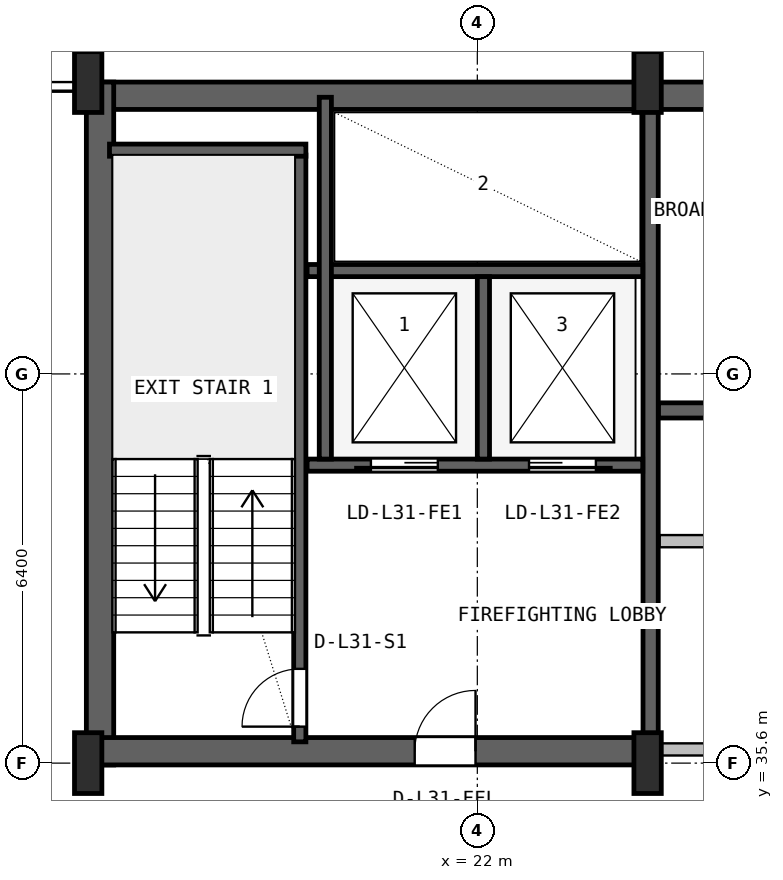
"""IFC4 building model, lengths in metres.
Left out: names, types, materials, properties, quantities, classifications, styles, units other than length and angle.
Written with IfcOpenShell. Run it as: python <this file> out.ifc"""

import sys

from ifc_helpers import new_model, si_unit, direction, frame, frame_2d, origin, origin_2d, place, context, subcontext, project, spatial, rectangle, i_section, extrude, source, transform, mapped, element, fill, save


model = new_model("IFC4")
c1 = context("Model", 3, precision=1e-05, world=origin(), true_north=direction((0.0, 1.0)))
c2 = subcontext(c1, "Body", "Model", "MODEL_VIEW")
j1 = project(units=[si_unit("LENGTHUNIT", "METRE"), si_unit("PLANEANGLEUNIT", "RADIAN")], contexts=[c1])
p1 = place(None, origin())
s1 = spatial("IfcSite", under=j1, at=p1, CompositionType="ELEMENT")
p2 = place(p1, origin())
s2 = spatial("IfcBuilding", under=s1, at=p2, CompositionType="ELEMENT")
p3 = place(p2, frame((0.0, 0.0, 129.6)))
s3 = spatial("IfcBuildingStorey", under=s2, at=p3, CompositionType="ELEMENT", Elevation=129.6)
p4 = place(p3, frame((15.6, 46.575, 0.0), z_axis=(0.0, 0.0, 1.0), x_axis=(1.0, 0.0, 0.0)))
e1 = element("IfcWall", 1, at=p4, inside=s3, PredefinedType="SHEAR", context=c2, shape_type="SweptSolid", body=[
    extrude(rectangle(XDim=36.8, YDim=0.45, at=frame_2d((18.4, 0.0))), origin(), (0.0, 0.0, 1.0), 3.55),
])
p5 = place(p3, frame((15.795, 35.57, 0.0), z_axis=(0.0, 0.0, 1.0), x_axis=(0.0, 1.0, 0.0)))
e2 = element("IfcWall", 2, at=p5, inside=s3, PredefinedType="SHEAR", context=c2, shape_type="SweptSolid", body=[
    extrude(rectangle(XDim=11.23, YDim=0.45, at=frame_2d((5.615, 0.0))), origin(), (0.0, 0.0, 1.0), 3.55),
])
p6 = place(p3, frame((15.57, 35.795, 0.0), z_axis=(0.0, 0.0, 1.0), x_axis=(1.0, 0.0, 0.0)))
e3 = element("IfcWall", 3, at=p6, inside=s3, PredefinedType="SHEAR", context=c2, shape_type="SweptSolid", body=[
    extrude(rectangle(XDim=9.23, YDim=0.45, at=frame_2d((4.615, 0.0))), origin(), (0.0, 0.0, 1.0), 3.55),
])
p7 = place(p6, frame((5.4, 0.0, 0.0)))
e4 = element("IfcOpeningElement", 4, at=p7, cuts=e3, PredefinedType="OPENING", context=c2, shape_type="SweptSolid", body=[
    extrude(rectangle(XDim=1.0, YDim=2.1, at=frame_2d((0.5, 1.05))), frame((0.0, 0.235, 0.0), z_axis=(0.0, -1.0, 0.0), x_axis=(1.0, 0.0, 0.0)), (0.0, 0.0, 1.0), 0.47),
])
m1 = source(origin(), c2, "Body", "SweptSolid", [
    extrude(i_section(OverallWidth=0.45, OverallDepth=1.0, WebThickness=0.016, FlangeThickness=0.03, FilletRadius=0.016, at=origin_2d()), origin(), (0.0, 0.0, 1.0), 3.8),
])
for number, where, z_axis, x_axis in (
    (5, (15.6, 35.6, 0.0), (0.0, 0.0, 1.0), (1.0, 0.0, 0.0)),
    (6, (15.6, 46.8, 0.0), (0.0, 0.0, 1.0), (1.0, 0.0, 0.0)),
    (7, (24.8, 35.6, 0.0), (0.0, 0.0, 1.0), (1.0, 0.0, 0.0)),
    (8, (24.8, 46.8, 0.0), (0.0, 0.0, 1.0), (1.0, 0.0, 0.0)),
):
    element("IfcColumn", number, at=place(p3, frame(where, z_axis=z_axis, x_axis=x_axis)), inside=s3, PredefinedType="COLUMN", context=c2, shape_type="MappedRepresentation", body=[
        mapped(m1, transform((0.0, 0.0, 0.0), x_axis=(1.0, 0.0, 0.0), y_axis=(0.0, 1.0, 0.0), z_axis=(0.0, 0.0, 1.0), scale=1.0)),
    ])
p8 = place(p3, frame((19.08, 35.95, 0.0), z_axis=(0.0, 0.0, 1.0), x_axis=(0.0, 1.0, 0.0)))
e9 = element("IfcWall", 9, at=p8, inside=s3, PredefinedType="SHEAR", context=c2, shape_type="SweptSolid", body=[
    extrude(rectangle(XDim=9.65, YDim=0.2, at=frame_2d((4.825, 0.0))), origin(), (0.0, 0.0, 1.0), 3.55),
])
p9 = place(p8, frame((0.25, 0.0, 0.0)))
e10 = element("IfcOpeningElement", 10, at=p9, cuts=e9, PredefinedType="OPENING", context=c2, shape_type="SweptSolid", body=[
    extrude(rectangle(XDim=0.95, YDim=2.1, at=frame_2d((0.475, 1.05))), frame((0.0, 0.11, 0.0), z_axis=(0.0, -1.0, 0.0), x_axis=(1.0, 0.0, 0.0)), (0.0, 0.0, 1.0), 0.22),
])
p10 = place(p3, frame((15.95, 45.68, 0.0), z_axis=(0.0, 0.0, 1.0), x_axis=(1.0, 0.0, 0.0)))
e11 = element("IfcWall", 11, at=p10, inside=s3, PredefinedType="SHEAR", context=c2, shape_type="SweptSolid", body=[
    extrude(rectangle(XDim=3.23, YDim=0.2, at=frame_2d((1.615, 0.0))), origin(), (0.0, 0.0, 1.0), 3.55),
])
p11 = place(p3, frame((24.85, 36.05, 0.0), z_axis=(0.0, 0.0, 1.0), x_axis=(0.0, 1.0, 0.0)))
e12 = element("IfcWall", 12, at=p11, inside=s3, PredefinedType="SHEAR", context=c2, shape_type="SweptSolid", body=[
    extrude(rectangle(XDim=10.45, YDim=0.25, at=frame_2d((5.225, 0.0))), origin(), (0.0, 0.0, 1.0), 3.55),
])
p12 = place(p3, frame((19.2, 40.5, 0.0), z_axis=(0.0, 0.0, 1.0), x_axis=(1.0, 0.0, 0.0)))
e13 = element("IfcWall", 13, at=p12, inside=s3, PredefinedType="SHEAR", context=c2, shape_type="SweptSolid", body=[
    extrude(rectangle(XDim=5.52, YDim=0.2, at=frame_2d((2.76, 0.0))), origin(), (0.0, 0.0, 1.0), 3.55),
])
p13 = place(p12, frame((1.05, 0.0, 0.0)))
e14 = element("IfcOpeningElement", 14, at=p13, cuts=e13, PredefinedType="OPENING", context=c2, shape_type="SweptSolid", body=[
    extrude(rectangle(XDim=1.1, YDim=2.18, at=frame_2d((0.55, 1.09))), frame((0.0, 0.11, 0.0), z_axis=(0.0, -1.0, 0.0), x_axis=(1.0, 0.0, 0.0)), (0.0, 0.0, 1.0), 0.22),
])
p14 = place(p12, frame((3.65, 0.0, 0.0)))
e15 = element("IfcOpeningElement", 15, at=p14, cuts=e13, PredefinedType="OPENING", context=c2, shape_type="SweptSolid", body=[
    extrude(rectangle(XDim=1.1, YDim=2.18, at=frame_2d((0.55, 1.09))), frame((0.0, 0.11, 0.0), z_axis=(0.0, -1.0, 0.0), x_axis=(1.0, 0.0, 0.0)), (0.0, 0.0, 1.0), 0.22),
])
p15 = place(p3, frame((19.2, 43.7, 0.0), z_axis=(0.0, 0.0, 1.0), x_axis=(1.0, 0.0, 0.0)))
e16 = element("IfcWall", 16, at=p15, inside=s3, PredefinedType="SHEAR", context=c2, shape_type="SweptSolid", body=[
    extrude(rectangle(XDim=5.52, YDim=0.2, at=frame_2d((2.76, 0.0))), origin(), (0.0, 0.0, 1.0), 3.55),
])
p16 = place(p3, frame((22.1, 40.6, 0.0), z_axis=(0.0, 0.0, 1.0), x_axis=(0.0, 1.0, 0.0)))
e17 = element("IfcWall", 17, at=p16, inside=s3, PredefinedType="SHEAR", context=c2, shape_type="SweptSolid", body=[
    extrude(rectangle(XDim=3.0, YDim=0.2, at=frame_2d((1.5, 0.0))), origin(), (0.0, 0.0, 1.0), 3.55),
])
p17 = place(p3, frame((19.5, 40.6, 0.0), z_axis=(0.0, 0.0, 1.0), x_axis=(0.0, 1.0, 0.0)))
e18 = element("IfcWall", 18, at=p17, inside=s3, PredefinedType="SHEAR", context=c2, shape_type="SweptSolid", body=[
    extrude(rectangle(XDim=5.95, YDim=0.2, at=frame_2d((2.975, 0.0))), origin(), (0.0, 0.0, 1.0), 3.55),
])
p18 = place(p3, frame((24.98, 41.4, 0.0), z_axis=(0.0, 0.0, 1.0), x_axis=(1.0, 0.0, 0.0)))
e19 = element("IfcWall", 19, at=p18, inside=s3, PredefinedType="SHEAR", context=c2, shape_type="SweptSolid", body=[
    extrude(rectangle(XDim=23.82, YDim=0.25, at=frame_2d((11.91, 0.0))), origin(), (0.0, 0.0, 1.0), 3.55),
])
p19 = place(p18, frame((8.87, 0.0, 0.0)))
e20 = element("IfcOpeningElement", 20, at=p19, cuts=e19, PredefinedType="OPENING", context=c2, shape_type="SweptSolid", body=[
    extrude(rectangle(XDim=1.1, YDim=2.18, at=frame_2d((0.55, 1.09))), frame((0.0, 0.135, 0.0), z_axis=(0.0, -1.0, 0.0), x_axis=(1.0, 0.0, 0.0)), (0.0, 0.0, 1.0), 0.27),
])
p20 = place(p18, frame((11.47, 0.0, 0.0)))
e21 = element("IfcOpeningElement", 21, at=p20, cuts=e19, PredefinedType="OPENING", context=c2, shape_type="SweptSolid", body=[
    extrude(rectangle(XDim=1.1, YDim=2.18, at=frame_2d((0.55, 1.09))), frame((0.0, 0.135, 0.0), z_axis=(0.0, -1.0, 0.0), x_axis=(1.0, 0.0, 0.0)), (0.0, 0.0, 1.0), 0.27),
])
p21 = place(p18, frame((14.07, 0.0, 0.0)))
e22 = element("IfcOpeningElement", 22, at=p21, cuts=e19, PredefinedType="OPENING", context=c2, shape_type="SweptSolid", body=[
    extrude(rectangle(XDim=1.1, YDim=2.18, at=frame_2d((0.55, 1.09))), frame((0.0, 0.135, 0.0), z_axis=(0.0, -1.0, 0.0), x_axis=(1.0, 0.0, 0.0)), (0.0, 0.0, 1.0), 0.27),
])
p22 = place(p18, frame((3.56, 0.0, 0.0)))
e23 = element("IfcOpeningElement", 23, at=p22, cuts=e19, PredefinedType="OPENING", context=c2, shape_type="SweptSolid", body=[
    extrude(rectangle(XDim=1.0, YDim=2.08, at=frame_2d((0.5, 1.04))), frame((0.0, 0.135, 0.0), z_axis=(0.0, -1.0, 0.0), x_axis=(1.0, 0.0, 0.0)), (0.0, 0.0, 1.0), 0.27),
])
p23 = place(p3, frame((25.0, 35.825, 0.0), z_axis=(0.0, 0.0, 1.0), x_axis=(1.0, 0.0, 0.0)))
e24 = element("IfcWall", 24, at=p23, inside=s3, PredefinedType="PLUMBINGWALL", context=c2, shape_type="SweptSolid", body=[
    extrude(rectangle(XDim=9.75, YDim=0.2, at=frame_2d((4.875, 0.0))), origin(), (0.0, 0.0, 1.0), 2.325),
])
p24 = place(p3, frame((25.0, 39.25, 0.0), z_axis=(0.0, 0.0, 1.0), x_axis=(1.0, 0.0, 0.0)))
e25 = element("IfcWall", 25, at=p24, inside=s3, PredefinedType="PLUMBINGWALL", context=c2, shape_type="SweptSolid", body=[
    extrude(rectangle(XDim=9.75, YDim=0.2, at=frame_2d((4.875, 0.0))), origin(), (0.0, 0.0, 1.0), 3.53),
])
p25 = place(p24, frame((1.75, 0.0, 0.0)))
e26 = element("IfcOpeningElement", 26, at=p25, cuts=e25, PredefinedType="OPENING", context=c2, shape_type="SweptSolid", body=[
    extrude(rectangle(XDim=0.9, YDim=2.06, at=frame_2d((0.45, 1.03))), frame((0.0, 0.11, 0.0), z_axis=(0.0, -1.0, 0.0), x_axis=(1.0, 0.0, 0.0)), (0.0, 0.0, 1.0), 0.22),
])
p26 = place(p24, frame((6.725, 0.0, 0.0)))
e27 = element("IfcOpeningElement", 27, at=p26, cuts=e25, PredefinedType="OPENING", context=c2, shape_type="SweptSolid", body=[
    extrude(rectangle(XDim=0.9, YDim=2.06, at=frame_2d((0.45, 1.03))), frame((0.0, 0.11, 0.0), z_axis=(0.0, -1.0, 0.0), x_axis=(1.0, 0.0, 0.0)), (0.0, 0.0, 1.0), 0.22),
])
m2 = source(origin(), c2, "Body", "SweptSolid", [
    extrude(rectangle(XDim=0.95, YDim=2.1, at=frame_2d((0.475, 1.05))), frame((0.0, 0.025, 0.0), z_axis=(0.0, -1.0, 0.0), x_axis=(1.0, 0.0, 0.0)), (0.0, 0.0, 1.0), 0.05),
])
p27 = place(p9, origin())
e28 = element("IfcDoor", 28, at=p27, inside=s3, OperationType="SINGLE_SWING_LEFT", PredefinedType="DOOR", context=c2, shape_type="MappedRepresentation", body=[
    mapped(m2, transform((0.0, 0.0, 0.0), x_axis=(1.0, 0.0, 0.0), y_axis=(0.0, 1.0, 0.0), z_axis=(0.0, 0.0, 1.0), scale=1.0)),
])
fill(e10, e28)
m3 = source(origin(), c2, "Body", "SweptSolid", [
    extrude(rectangle(XDim=1.0, YDim=2.1, at=frame_2d((0.5, 1.05))), frame((0.0, 0.025, 0.0), z_axis=(0.0, -1.0, 0.0), x_axis=(1.0, 0.0, 0.0)), (0.0, 0.0, 1.0), 0.05),
])
p28 = place(p7, origin())
e29 = element("IfcDoor", 29, at=p28, inside=s3, OperationType="SINGLE_SWING_RIGHT", PredefinedType="DOOR", context=c2, shape_type="MappedRepresentation", body=[
    mapped(m3, transform((0.0, 0.0, 0.0), x_axis=(1.0, 0.0, 0.0), y_axis=(0.0, 1.0, 0.0), z_axis=(0.0, 0.0, 1.0), scale=1.0)),
])
fill(e4, e29)
m4 = source(origin(), c2, "Body", "SweptSolid", [
    extrude(rectangle(XDim=1.1, YDim=2.18, at=frame_2d((0.55, 1.09))), frame((0.0, 0.025, 0.0), z_axis=(0.0, -1.0, 0.0), x_axis=(1.0, 0.0, 0.0)), (0.0, 0.0, 1.0), 0.05),
])
p29 = place(p13, frame((1.1, 0.0, 0.0), z_axis=(0.0, 0.0, 1.0), x_axis=(-1.0, 0.0, 0.0)))
e30 = element("IfcDoor", 30, at=p29, inside=s3, OperationType="SLIDING_TO_LEFT", PredefinedType="DOOR", context=c2, shape_type="MappedRepresentation", body=[
    mapped(m4, transform((0.0, 0.0, 0.0), x_axis=(1.0, 0.0, 0.0), y_axis=(0.0, 1.0, 0.0), z_axis=(0.0, 0.0, 1.0), scale=1.0)),
])
fill(e14, e30)
p30 = place(p14, frame((1.1, 0.0, 0.0), z_axis=(0.0, 0.0, 1.0), x_axis=(-1.0, 0.0, 0.0)))
e31 = element("IfcDoor", 31, at=p30, inside=s3, OperationType="SLIDING_TO_RIGHT", PredefinedType="DOOR", context=c2, shape_type="MappedRepresentation", body=[
    mapped(m4, transform((0.0, 0.0, 0.0), x_axis=(1.0, 0.0, 0.0), y_axis=(0.0, 1.0, 0.0), z_axis=(0.0, 0.0, 1.0), scale=1.0)),
])
fill(e15, e31)
save(model, sys.argv[1])
